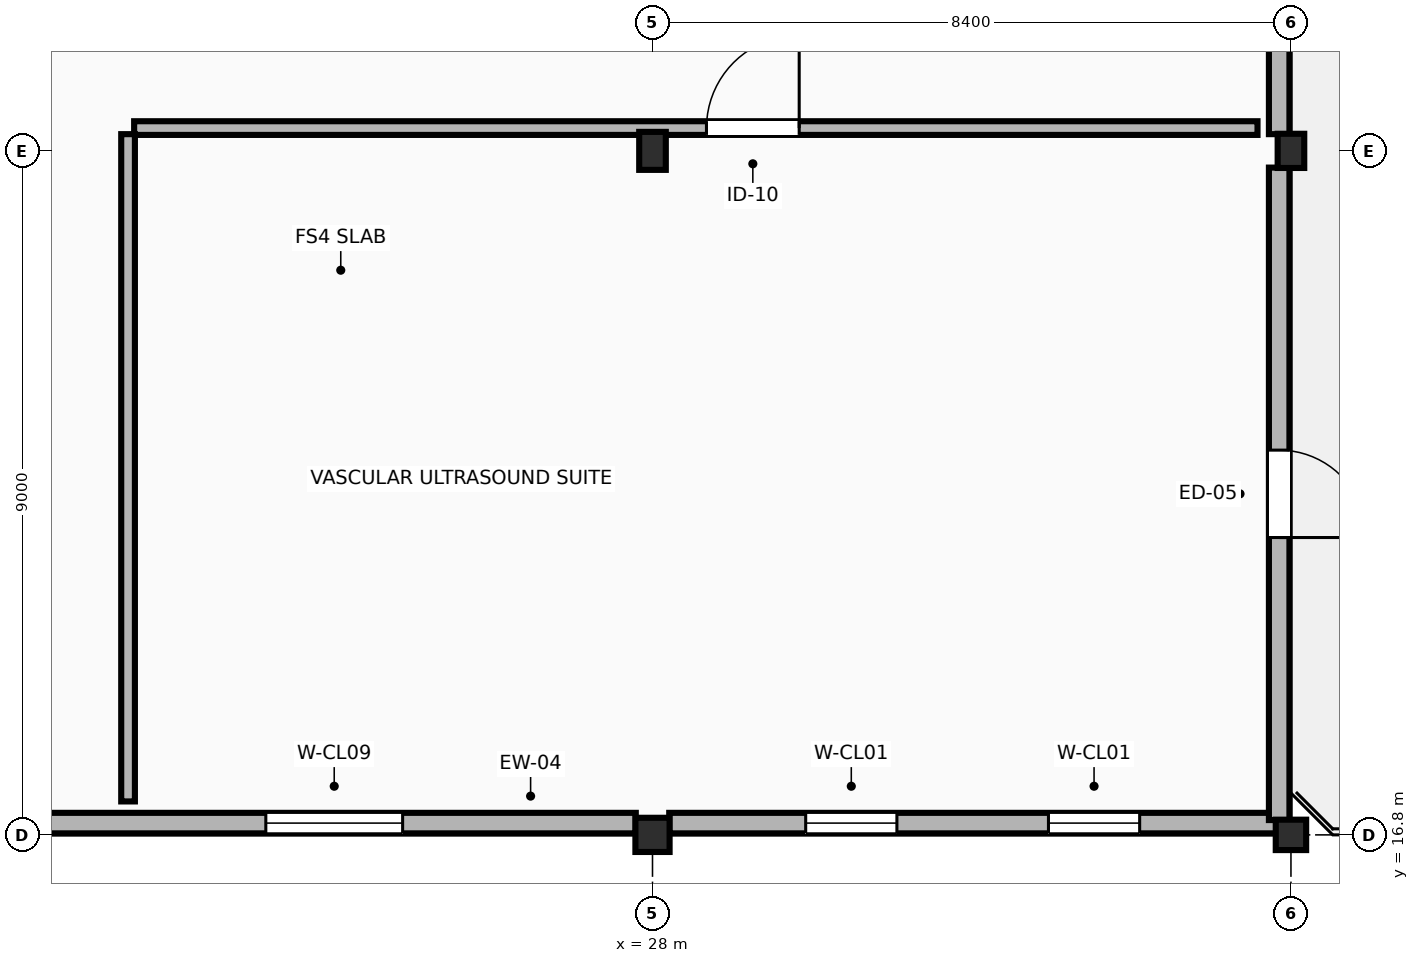
"""IFC4 building model, lengths in metres.
Left out: names, types, materials, properties, quantities, classifications, styles, units other than length and angle.
Written with IfcOpenShell. Run it as: python <this file> out.ifc"""

import sys

from ifc_helpers import new_model, si_unit, direction, frame, frame_2d, origin, origin_2d, place, context, subcontext, project, spatial, rectangle, extrude, element, fill, save


model = new_model("IFC4")
c1 = context("Model", 3, precision=1e-05, world=origin(), true_north=direction((0.0, 1.0)))
c2 = subcontext(c1, "Body", "Model", "MODEL_VIEW")
j1 = project(units=[si_unit("LENGTHUNIT", "METRE"), si_unit("PLANEANGLEUNIT", "RADIAN")], contexts=[c1])
p1 = place(None, origin())
s1 = spatial("IfcSite", under=j1, at=p1, CompositionType="ELEMENT")
p2 = place(p1, origin())
s2 = spatial("IfcBuilding", under=s1, at=p2, CompositionType="ELEMENT")
p3 = place(p2, frame((0.0, 0.0, 13.8)))
s3 = spatial("IfcBuildingStorey", under=s2, at=p3, CompositionType="ELEMENT", Elevation=13.8)
p4 = place(p3, frame((28.0, 16.8, 0.0), z_axis=(0.0, 0.0, 1.0), x_axis=(1.0, 0.0, 0.0)))
e1 = element("IfcColumn", 1, at=p4, inside=s3, PredefinedType="COLUMN", context=c2, shape_type="SweptSolid", body=[
    extrude(rectangle(XDim=0.45, YDim=0.45, at=origin_2d()), origin(), (0.0, 0.0, 1.0), 4.2),
])
p5 = place(p3, frame((28.0, 25.8, 0.0), z_axis=(0.0, 0.0, 1.0), x_axis=(1.0, 0.0, 0.0)))
e2 = element("IfcColumn", 2, at=p5, inside=s3, PredefinedType="COLUMN", context=c2, shape_type="SweptSolid", body=[
    extrude(rectangle(XDim=0.35, YDim=0.5, at=origin_2d()), origin(), (0.0, 0.0, 1.0), 4.2),
])
p6 = place(p3, frame((36.4, 16.8, 0.0), z_axis=(0.0, 0.0, 1.0), x_axis=(1.0, 0.0, 0.0)))
e3 = element("IfcColumn", 3, at=p6, inside=s3, PredefinedType="COLUMN", context=c2, shape_type="SweptSolid", body=[
    extrude(rectangle(XDim=0.4, YDim=0.4, at=origin_2d()), origin(), (0.0, 0.0, 1.0), 4.2),
])
p7 = place(p3, frame((36.4, 25.8, 0.0), z_axis=(0.0, 0.0, 1.0), x_axis=(1.0, 0.0, 0.0)))
e4 = element("IfcColumn", 4, at=p7, inside=s3, PredefinedType="COLUMN", context=c2, shape_type="SweptSolid", body=[
    extrude(rectangle(XDim=0.35, YDim=0.45, at=origin_2d()), origin(), (0.0, 0.0, 1.0), 4.2),
])
p8 = place(p3, frame((19.845, 16.955, 0.0), z_axis=(0.0, 0.0, 1.0), x_axis=(1.0, 0.0, 0.0)))
e5 = element("IfcWall", 5, at=p8, inside=s3, PredefinedType="STANDARD", context=c2, shape_type="SweptSolid", body=[
    extrude(rectangle(XDim=7.935, YDim=0.27, at=frame_2d((3.968, 0.0))), origin(), (0.0, 0.0, 1.0), 3.255),
])
p9 = place(p8, frame((3.067, 0.0, 1.75)))
e6 = element("IfcOpeningElement", 6, at=p9, cuts=e5, PredefinedType="OPENING", context=c2, shape_type="SweptSolid", body=[
    extrude(rectangle(XDim=1.8, YDim=0.9, at=frame_2d((0.9, 0.45))), frame((0.0, 0.145, 0.0), z_axis=(0.0, -1.0, 0.0), x_axis=(1.0, 0.0, 0.0)), (0.0, 0.0, 1.0), 0.29),
])
p10 = place(p3, frame((28.22, 16.955, 0.0), z_axis=(0.0, 0.0, 1.0), x_axis=(1.0, 0.0, 0.0)))
e7 = element("IfcWall", 7, at=p10, inside=s3, PredefinedType="STANDARD", context=c2, shape_type="SweptSolid", body=[
    extrude(rectangle(XDim=7.985, YDim=0.27, at=frame_2d((3.993, 0.0))), origin(), (0.0, 0.0, 1.0), 3.255),
])
p11 = place(p10, frame((1.795, 0.0, 0.95)))
e8 = element("IfcOpeningElement", 8, at=p11, cuts=e7, PredefinedType="OPENING", context=c2, shape_type="SweptSolid", body=[
    extrude(rectangle(XDim=1.2, YDim=1.5, at=frame_2d((0.6, 0.75))), frame((0.0, 0.145, 0.0), z_axis=(0.0, -1.0, 0.0), x_axis=(1.0, 0.0, 0.0)), (0.0, 0.0, 1.0), 0.29),
])
p12 = place(p10, frame((4.99, 0.0, 0.95)))
e9 = element("IfcOpeningElement", 9, at=p12, cuts=e7, PredefinedType="OPENING", context=c2, shape_type="SweptSolid", body=[
    extrude(rectangle(XDim=1.2, YDim=1.5, at=frame_2d((0.6, 0.75))), frame((0.0, 0.145, 0.0), z_axis=(0.0, -1.0, 0.0), x_axis=(1.0, 0.0, 0.0)), (0.0, 0.0, 1.0), 0.29),
])
p13 = place(p3, frame((36.245, 16.995, 0.0), z_axis=(0.0, 0.0, 1.0), x_axis=(0.0, 1.0, 0.0)))
e10 = element("IfcWall", 10, at=p13, inside=s3, PredefinedType="STANDARD", context=c2, shape_type="SweptSolid", body=[
    extrude(rectangle(XDim=8.585, YDim=0.27, at=frame_2d((4.292, 0.0))), origin(), (0.0, 0.0, 1.0), 3.305),
])
p14 = place(p13, frame((3.718, 0.0, 0.0)))
e11 = element("IfcOpeningElement", 11, at=p14, cuts=e10, PredefinedType="OPENING", context=c2, shape_type="SweptSolid", body=[
    extrude(rectangle(XDim=1.15, YDim=2.2, at=frame_2d((0.575, 1.1))), frame((0.0, 0.145, 0.0), z_axis=(0.0, -1.0, 0.0), x_axis=(1.0, 0.0, 0.0)), (0.0, 0.0, 1.0), 0.29),
])
p15 = place(p3, frame((36.245, 26.02, 0.0), z_axis=(0.0, 0.0, 1.0), x_axis=(0.0, 1.0, 0.0)))
e12 = element("IfcWall", 12, at=p15, inside=s3, PredefinedType="STANDARD", context=c2, shape_type="SweptSolid", body=[
    extrude(rectangle(XDim=8.36, YDim=0.27, at=frame_2d((4.18, 0.0))), origin(), (0.0, 0.0, 1.0), 3.405),
])
p16 = place(p15, frame((1.758, 0.0, 0.95)))
e13 = element("IfcOpeningElement", 13, at=p16, cuts=e12, PredefinedType="OPENING", context=c2, shape_type="SweptSolid", body=[
    extrude(rectangle(XDim=1.5, YDim=1.65, at=frame_2d((0.75, 0.825))), frame((0.0, 0.145, 0.0), z_axis=(0.0, -1.0, 0.0), x_axis=(1.0, 0.0, 0.0)), (0.0, 0.0, 1.0), 0.29),
])
p17 = place(p15, frame((5.102, 0.0, 0.95)))
e14 = element("IfcOpeningElement", 14, at=p17, cuts=e12, PredefinedType="OPENING", context=c2, shape_type="SweptSolid", body=[
    extrude(rectangle(XDim=1.5, YDim=1.65, at=frame_2d((0.75, 0.825))), frame((0.0, 0.145, 0.0), z_axis=(0.0, -1.0, 0.0), x_axis=(1.0, 0.0, 0.0)), (0.0, 0.0, 1.0), 0.29),
])
p18 = place(p3, frame((21.18, 26.1, 0.0), z_axis=(0.0, 0.0, 1.0), x_axis=(1.0, 0.0, 0.0)))
e15 = element("IfcWall", 15, at=p18, inside=s3, PredefinedType="PARTITIONING", context=c2, shape_type="SweptSolid", body=[
    extrude(rectangle(XDim=14.78, YDim=0.18, at=frame_2d((7.39, 0.0))), origin(), (0.0, 0.0, 1.0), 3.255),
])
p19 = place(p18, frame((7.53, 0.0, 0.0)))
e16 = element("IfcOpeningElement", 16, at=p19, cuts=e15, PredefinedType="OPENING", context=c2, shape_type="SweptSolid", body=[
    extrude(rectangle(XDim=1.22, YDim=2.18, at=frame_2d((0.61, 1.09))), frame((0.0, 0.1, 0.0), z_axis=(0.0, -1.0, 0.0), x_axis=(1.0, 0.0, 0.0)), (0.0, 0.0, 1.0), 0.2),
])
p20 = place(p3, frame((21.1, 17.24, 0.0), z_axis=(0.0, 0.0, 1.0), x_axis=(0.0, 1.0, 0.0)))
e17 = element("IfcWall", 17, at=p20, inside=s3, PredefinedType="PARTITIONING", context=c2, shape_type="SweptSolid", body=[
    extrude(rectangle(XDim=8.78, YDim=0.18, at=frame_2d((4.39, 0.0))), origin(), (0.0, 0.0, 1.0), 3.92),
])
p21 = place(p9, origin())
e18 = element("IfcWindow", 18, at=p21, inside=s3, PartitioningType="SINGLE_PANEL", PredefinedType="WINDOW", context=c2, shape_type="SweptSolid", body=[
    extrude(rectangle(XDim=1.8, YDim=0.9, at=frame_2d((0.9, 0.45))), frame((0.0, 0.03, 0.0), z_axis=(0.0, -1.0, 0.0), x_axis=(1.0, 0.0, 0.0)), (0.0, 0.0, 1.0), 0.06),
])
fill(e6, e18)
p22 = place(p11, origin())
e19 = element("IfcWindow", 19, at=p22, inside=s3, PartitioningType="SINGLE_PANEL", PredefinedType="WINDOW", context=c2, shape_type="SweptSolid", body=[
    extrude(rectangle(XDim=1.2, YDim=1.5, at=frame_2d((0.6, 0.75))), frame((0.0, 0.03, 0.0), z_axis=(0.0, -1.0, 0.0), x_axis=(1.0, 0.0, 0.0)), (0.0, 0.0, 1.0), 0.06),
])
fill(e8, e19)
p23 = place(p12, origin())
e20 = element("IfcWindow", 20, at=p23, inside=s3, PartitioningType="SINGLE_PANEL", PredefinedType="WINDOW", context=c2, shape_type="SweptSolid", body=[
    extrude(rectangle(XDim=1.2, YDim=1.5, at=frame_2d((0.6, 0.75))), frame((0.0, 0.03, 0.0), z_axis=(0.0, -1.0, 0.0), x_axis=(1.0, 0.0, 0.0)), (0.0, 0.0, 1.0), 0.06),
])
fill(e9, e20)
p24 = place(p14, frame((1.15, 0.0, 0.0), z_axis=(0.0, 0.0, 1.0), x_axis=(-1.0, 0.0, 0.0)))
e21 = element("IfcDoor", 21, at=p24, inside=s3, OperationType="SINGLE_SWING_RIGHT", PredefinedType="DOOR", context=c2, shape_type="SweptSolid", body=[
    extrude(rectangle(XDim=1.15, YDim=2.2, at=frame_2d((0.575, 1.1))), frame((0.0, 0.025, 0.0), z_axis=(0.0, -1.0, 0.0), x_axis=(1.0, 0.0, 0.0)), (0.0, 0.0, 1.0), 0.05),
])
fill(e11, e21)
p25 = place(p19, origin())
e22 = element("IfcDoor", 22, at=p25, inside=s3, OperationType="SINGLE_SWING_RIGHT", PredefinedType="DOOR", context=c2, shape_type="SweptSolid", body=[
    extrude(rectangle(XDim=1.22, YDim=2.18, at=frame_2d((0.61, 1.09))), frame((0.0, 0.025, 0.0), z_axis=(0.0, -1.0, 0.0), x_axis=(1.0, 0.0, 0.0)), (0.0, 0.0, 1.0), 0.05),
])
fill(e16, e22)
save(model, sys.argv[1])
